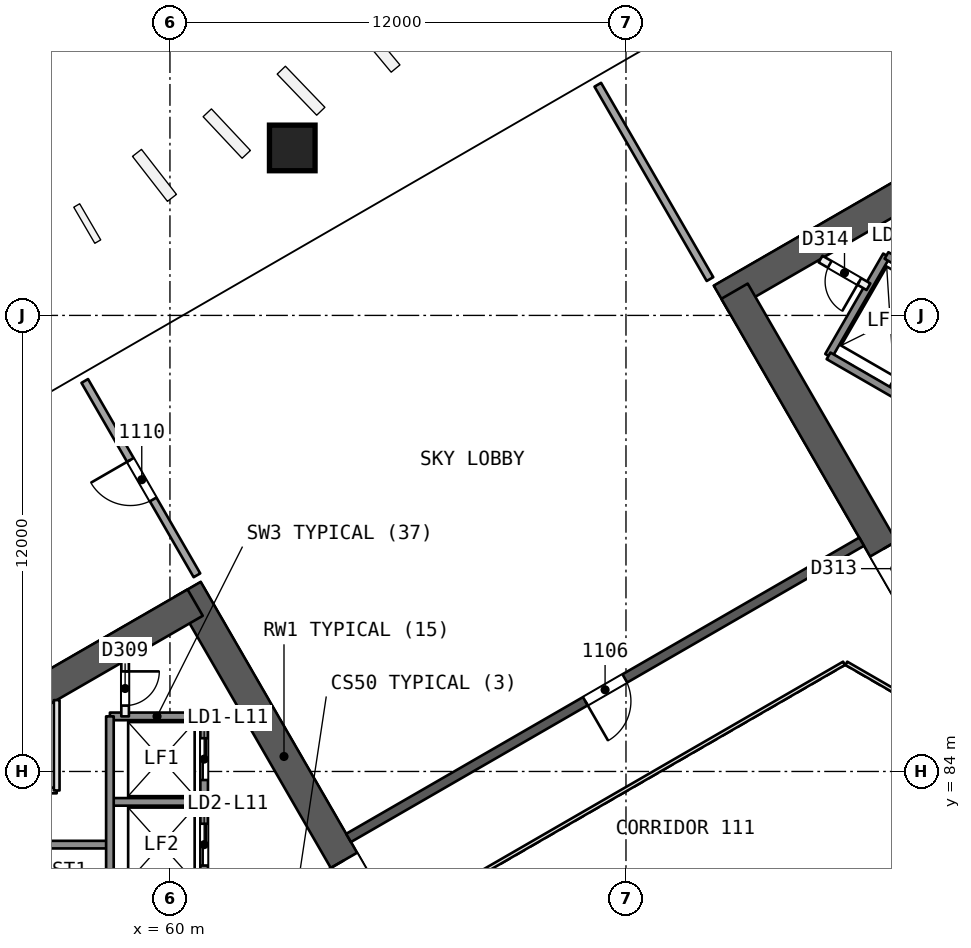
"""IFC4 building model, lengths in metres.
Left out: names, types, materials, properties, quantities, classifications, styles, units other than length and angle.
Written with IfcOpenShell. Run it as: python <this file> out.ifc"""

import sys

from ifc_helpers import new_model, si_unit, direction, frame, frame_2d, origin, origin_2d, place, context, subcontext, project, spatial, rectangle, extrude, element, fill, save


model = new_model("IFC4")
c1 = context("Model", 3, precision=1e-05, world=origin(), true_north=direction((0.0, 1.0)))
c2 = subcontext(c1, "Body", "Model", "MODEL_VIEW")
j1 = project(units=[si_unit("LENGTHUNIT", "METRE"), si_unit("PLANEANGLEUNIT", "RADIAN")], contexts=[c1])
p1 = place(None, origin())
s1 = spatial("IfcSite", under=j1, at=p1, CompositionType="ELEMENT")
p2 = place(p1, origin())
s2 = spatial("IfcBuilding", under=s1, at=p2, CompositionType="ELEMENT")
p3 = place(p2, frame((0.0, 0.0, 52.9)))
s3 = spatial("IfcBuildingStorey", under=s2, at=p3, CompositionType="ELEMENT", Elevation=52.9)
p4 = place(p3, frame((65.538, 80.0, 0.0), z_axis=(0.0, 0.0, 1.0), x_axis=(-0.49999662545, 0.866027352073, 0.0)))
e1 = element("IfcWall", 1, at=p4, inside=s3, PredefinedType="SHEAR", context=c2, shape_type="SweptSolid", body=[
    extrude(rectangle(XDim=10.149, YDim=0.8, at=frame_2d((5.074, 0.0))), origin(), (0.0, 0.0, 1.0), 4.4),
])
p5 = place(p4, frame((0.719, 0.0, 0.0)))
e2 = element("IfcOpeningElement", 2, at=p5, cuts=e1, PredefinedType="OPENING", context=c2, shape_type="SweptSolid", body=[
    extrude(rectangle(XDim=1.2, YDim=2.1, at=frame_2d((0.6, 1.05))), frame((0.0, 0.411, 0.0), z_axis=(0.0, -1.0, 0.0), x_axis=(1.0, 0.0, 0.0)), (0.0, 0.0, 1.0), 0.821),
])
p6 = place(p3, frame((60.664, 88.443, 0.0), z_axis=(0.0, 0.0, 1.0), x_axis=(-0.866029478545, -0.499992942241, 0.0)))
e3 = element("IfcWall", 3, at=p6, inside=s3, PredefinedType="SHEAR", context=c2, shape_type="SweptSolid", body=[
    extrude(rectangle(XDim=13.933, YDim=0.8, at=frame_2d((6.967, 0.0))), origin(), (0.0, 0.0, 1.0), 4.4),
])
p7 = place(p3, frame((86.723, 103.488, 0.0), z_axis=(0.0, 0.0, 1.0), x_axis=(-0.866032504327, -0.499987701298, 0.0)))
e4 = element("IfcWall", 4, at=p7, inside=s3, PredefinedType="SHEAR", context=c2, shape_type="SweptSolid", body=[
    extrude(rectangle(XDim=14.102, YDim=0.8, at=frame_2d((7.051, 0.0))), origin(), (0.0, 0.0, 1.0), 4.4),
])
p8 = place(p3, frame((74.856, 96.637, 0.0), z_axis=(0.0, 0.0, 1.0), x_axis=(0.499993500917, -0.866029155999, 0.0)))
e5 = element("IfcWall", 5, at=p8, inside=s3, PredefinedType="SHEAR", context=c2, shape_type="SweptSolid", body=[
    extrude(rectangle(XDim=9.98, YDim=0.8, at=frame_2d((4.99, 0.0))), origin(), (0.0, 0.0, 1.0), 4.4),
])
p9 = place(p8, frame((7.83, 0.0, 0.0)))
e6 = element("IfcOpeningElement", 6, at=p9, cuts=e5, PredefinedType="OPENING", context=c2, shape_type="SweptSolid", body=[
    extrude(rectangle(XDim=1.2, YDim=2.1, at=frame_2d((0.6, 1.05))), frame((0.0, 0.411, 0.0), z_axis=(0.0, -1.0, 0.0), x_axis=(1.0, 0.0, 0.0)), (0.0, 0.0, 1.0), 0.821),
])
p10 = place(p3, frame((78.2, 90.046, 0.0), z_axis=(0.0, 0.0, 1.0), x_axis=(-0.866026492143, -0.499998114903, 0.0)))
e7 = element("IfcWall", 7, at=p10, inside=s3, PredefinedType="SHEAR", context=c2, shape_type="SweptSolid", body=[
    extrude(rectangle(XDim=15.588, YDim=0.25, at=frame_2d((7.794, 0.0))), origin(), (0.0, 0.0, 1.0), 3.9),
])
p11 = place(p10, frame((7.194, 0.0, 0.0)))
e8 = element("IfcOpeningElement", 8, at=p11, cuts=e7, PredefinedType="OPENING", context=c2, shape_type="SweptSolid", body=[
    extrude(rectangle(XDim=1.2, YDim=2.4, at=frame_2d((0.6, 1.2))), frame((0.0, 0.135, 0.0), z_axis=(0.0, -1.0, 0.0), x_axis=(1.0, 0.0, 0.0)), (0.0, 0.0, 1.0), 0.271),
])
p12 = place(p3, frame((63.206, 100.427, 0.0), z_axis=(0.010096151254, -0.017474107939, 0.999796340902), x_axis=(-0.500171963961, 0.865690897347, 0.020181098047)))
e9 = element("IfcColumn", 9, at=p12, inside=s3, PredefinedType="COLUMN", context=c2, shape_type="SweptSolid", body=[
    extrude(rectangle(XDim=1.2, YDim=1.2, at=origin_2d()), origin(), (0.0, 0.0, 1.0), 4.401),
])
p13 = place(p3, frame((60.71, 89.162, 0.0), z_axis=(0.0, 0.0, 1.0), x_axis=(-0.49999445743, 0.866028603765, 0.0)))
e10 = element("IfcWall", 10, at=p13, inside=s3, PredefinedType="PARTITIONING", context=c2, shape_type="SweptSolid", body=[
    extrude(rectangle(XDim=5.905, YDim=0.2, at=frame_2d((2.952, 0.0))), origin(), (0.0, 0.0, 1.0), 3.9),
])
p14 = place(p13, frame((2.305, 0.0, 0.0)))
e11 = element("IfcOpeningElement", 11, at=p14, cuts=e10, PredefinedType="OPENING", context=c2, shape_type="SweptSolid", body=[
    extrude(rectangle(XDim=1.2, YDim=2.4, at=frame_2d((0.6, 1.2))), frame((0.0, 0.11, 0.0), z_axis=(0.0, -1.0, 0.0), x_axis=(1.0, 0.0, 0.0)), (0.0, 0.0, 1.0), 0.221),
])
p15 = place(p3, frame((71.258, 102.07, 0.0), z_axis=(0.0, 0.0, 1.0), x_axis=(0.49999445743, -0.866028603765, 0.0)))
e12 = element("IfcWall", 12, at=p15, inside=s3, PredefinedType="PARTITIONING", context=c2, shape_type="SweptSolid", body=[
    extrude(rectangle(XDim=5.905, YDim=0.2, at=frame_2d((2.952, 0.0))), origin(), (0.0, 0.0, 1.0), 3.9),
])
p16 = place(p3, frame((60.9, 85.45, 0.0), z_axis=(0.0, 0.0, 1.0), x_axis=(-1.0, 0.0, 0.0)))
e13 = element("IfcWall", 13, at=p16, inside=s3, PredefinedType="SOLIDWALL", context=c2, shape_type="SweptSolid", body=[
    extrude(rectangle(XDim=2.48, YDim=0.2, at=frame_2d((1.24, 0.0))), origin(), (0.0, 0.0, 1.0), 3.9),
])
p17 = place(p3, frame((57.02, 83.5, 0.0), z_axis=(0.0, 0.0, 1.0), x_axis=(-1.0, 0.0, 0.0)))
e14 = element("IfcWall", 14, at=p17, inside=s3, PredefinedType="PARTITIONING", context=c2, shape_type="SweptSolid", body=[
    extrude(rectangle(XDim=4.118, YDim=0.15, at=frame_2d((2.059, 0.0))), origin(), (0.0, 0.0, 1.0), 3.9),
])
p18 = place(p17, frame((1.582, 0.0, 0.0)))
e15 = element("IfcOpeningElement", 15, at=p18, cuts=e14, PredefinedType="OPENING", context=c2, shape_type="SweptSolid", body=[
    extrude(rectangle(XDim=0.9, YDim=2.1, at=frame_2d((0.45, 1.05))), frame((0.0, 0.085, 0.0), z_axis=(0.0, -1.0, 0.0), x_axis=(1.0, 0.0, 0.0)), (0.0, 0.0, 1.0), 0.171),
])
p19 = place(p3, frame((60.9, 83.2, 0.0), z_axis=(0.0, 0.0, 1.0), x_axis=(-1.0, 0.0, 0.0)))
e16 = element("IfcWall", 16, at=p19, inside=s3, PredefinedType="SOLIDWALL", context=c2, shape_type="SweptSolid", body=[
    extrude(rectangle(XDim=2.48, YDim=0.2, at=frame_2d((1.24, 0.0))), origin(), (0.0, 0.0, 1.0), 3.9),
])
p20 = place(p3, frame((58.42, 82.075, 0.0), z_axis=(0.0, 0.0, 1.0), x_axis=(-1.0, 0.0, 0.0)))
e17 = element("IfcWall", 17, at=p20, inside=s3, PredefinedType="SOLIDWALL", context=c2, shape_type="SweptSolid", body=[
    extrude(rectangle(XDim=7.7, YDim=0.2, at=frame_2d((3.85, 0.0))), origin(), (0.0, 0.0, 1.0), 3.9),
])
p21 = place(p3, frame((60.9, 85.45, 0.0), z_axis=(0.0, 0.0, 1.0), x_axis=(0.0, -1.0, 0.0)))
e18 = element("IfcWall", 18, at=p21, inside=s3, PredefinedType="SOLIDWALL", context=c2, shape_type="SweptSolid", body=[
    extrude(rectangle(XDim=10.9, YDim=0.2, at=frame_2d((5.45, 0.0))), origin(), (0.0, 0.0, 1.0), 3.9),
])
p22 = place(p21, frame((0.575, 0.0, 0.0)))
e19 = element("IfcOpeningElement", 19, at=p22, cuts=e18, PredefinedType="OPENING", context=c2, shape_type="SweptSolid", body=[
    extrude(rectangle(XDim=1.1, YDim=2.1, at=frame_2d((0.55, 1.05))), frame((0.0, 0.11, 0.0), z_axis=(0.0, -1.0, 0.0), x_axis=(1.0, 0.0, 0.0)), (0.0, 0.0, 1.0), 0.221),
])
p23 = place(p21, frame((2.825, 0.0, 0.0)))
e20 = element("IfcOpeningElement", 20, at=p23, cuts=e18, PredefinedType="OPENING", context=c2, shape_type="SweptSolid", body=[
    extrude(rectangle(XDim=1.1, YDim=2.1, at=frame_2d((0.55, 1.05))), frame((0.0, 0.11, 0.0), z_axis=(0.0, -1.0, 0.0), x_axis=(1.0, 0.0, 0.0)), (0.0, 0.0, 1.0), 0.221),
])
p24 = place(p21, frame((5.075, 0.0, 0.0)))
e21 = element("IfcOpeningElement", 21, at=p24, cuts=e18, PredefinedType="OPENING", context=c2, shape_type="SweptSolid", body=[
    extrude(rectangle(XDim=1.1, YDim=2.1, at=frame_2d((0.55, 1.05))), frame((0.0, 0.11, 0.0), z_axis=(0.0, -1.0, 0.0), x_axis=(1.0, 0.0, 0.0)), (0.0, 0.0, 1.0), 0.221),
])
p25 = place(p21, frame((7.325, 0.0, 0.0)))
e22 = element("IfcOpeningElement", 22, at=p25, cuts=e18, PredefinedType="OPENING", context=c2, shape_type="SweptSolid", body=[
    extrude(rectangle(XDim=1.1, YDim=2.1, at=frame_2d((0.55, 1.05))), frame((0.0, 0.11, 0.0), z_axis=(0.0, -1.0, 0.0), x_axis=(1.0, 0.0, 0.0)), (0.0, 0.0, 1.0), 0.221),
])
p26 = place(p3, frame((58.82, 86.917, 0.0), z_axis=(0.0, 0.0, 1.0), x_axis=(0.0, -1.0, 0.0)))
e23 = element("IfcWall", 23, at=p26, inside=s3, PredefinedType="PARTITIONING", context=c2, shape_type="SweptSolid", body=[
    extrude(rectangle(XDim=1.467, YDim=0.2, at=frame_2d((0.733, 0.0))), origin(), (0.0, 0.0, 1.0), 3.9),
])
p27 = place(p26, frame((0.283, 0.0, 0.0)))
e24 = element("IfcOpeningElement", 24, at=p27, cuts=e23, PredefinedType="OPENING", context=c2, shape_type="SweptSolid", body=[
    extrude(rectangle(XDim=0.9, YDim=2.1, at=frame_2d((0.45, 1.05))), frame((0.0, 0.11, 0.0), z_axis=(0.0, -1.0, 0.0), x_axis=(1.0, 0.0, 0.0)), (0.0, 0.0, 1.0), 0.221),
])
p28 = place(p3, frame((58.42, 85.45, 0.0), z_axis=(0.0, 0.0, 1.0), x_axis=(0.0, -1.0, 0.0)))
e25 = element("IfcWall", 25, at=p28, inside=s3, PredefinedType="SOLIDWALL", context=c2, shape_type="SweptSolid", body=[
    extrude(rectangle(XDim=9.0, YDim=0.2, at=frame_2d((4.5, 0.0))), origin(), (0.0, 0.0, 1.0), 3.9),
])
p29 = place(p3, frame((57.02, 85.877, 0.0), z_axis=(0.0, 0.0, 1.0), x_axis=(0.0, -1.0, 0.0)))
e26 = element("IfcWall", 26, at=p29, inside=s3, PredefinedType="PARTITIONING", context=c2, shape_type="SweptSolid", body=[
    extrude(rectangle(XDim=2.377, YDim=0.15, at=frame_2d((1.189, 0.0))), origin(), (0.0, 0.0, 1.0), 3.9),
])
for number, where, z_axis, x_axis in (
    (27, (78.976, 93.986, 0.0), (0.0, 0.0, 1.0), (0.5, 0.866, 0.0)),
    (28, (77.33, 94.936, 0.0), (0.0, 0.0, 1.0), (0.5, 0.866, 0.0)),
):
    element("IfcWall", number, at=place(p3, frame(where, z_axis=z_axis, x_axis=x_axis)), inside=s3, PredefinedType="SOLIDWALL", context=c2, shape_type="SweptSolid", body=[
        extrude(rectangle(XDim=3.05, YDim=0.2, at=frame_2d((1.525, 0.0))), origin(), (0.0, 0.0, 1.0), 3.9),
    ])
p30 = place(p3, frame((86.77, 89.486, 0.0), z_axis=(0.0, 0.0, 1.0), x_axis=(-0.86601811187, 0.500012629753, 0.0)))
e29 = element("IfcWall", 29, at=p30, inside=s3, PredefinedType="SOLIDWALL", context=c2, shape_type="SweptSolid", body=[
    extrude(rectangle(XDim=10.9, YDim=0.2, at=frame_2d((5.45, 0.0))), origin(), (0.0, 0.0, 1.0), 3.9),
])
p31 = place(p3, frame((78.38, 96.755, 0.0), z_axis=(0.0, 0.0, 1.0), x_axis=(-0.866003949776, 0.500037157592, 0.0)))
e30 = element("IfcWall", 30, at=p31, inside=s3, PredefinedType="PARTITIONING", context=c2, shape_type="SweptSolid", body=[
    extrude(rectangle(XDim=1.455, YDim=0.2, at=frame_2d((0.728, 0.0))), origin(), (0.0, 0.0, 1.0), 3.9),
])
p32 = place(p31, frame((0.278, 0.0, 0.0)))
e31 = element("IfcOpeningElement", 31, at=p32, cuts=e30, PredefinedType="OPENING", context=c2, shape_type="SweptSolid", body=[
    extrude(rectangle(XDim=0.9, YDim=2.1, at=frame_2d((0.45, 1.05))), frame((0.0, 0.11, 0.0), z_axis=(0.0, -1.0, 0.0), x_axis=(1.0, 0.0, 0.0)), (0.0, 0.0, 1.0), 0.221),
])
p33 = place(p3, frame((80.5, 96.627, 0.0), z_axis=(0.0, 0.0, 1.0), x_axis=(-0.86601224135, 0.500022797313, 0.0)))
e32 = element("IfcWall", 32, at=p33, inside=s3, PredefinedType="SOLIDWALL", context=c2, shape_type="SweptSolid", body=[
    extrude(rectangle(XDim=1.9, YDim=0.2, at=frame_2d((0.95, 0.0))), origin(), (0.0, 0.0, 1.0), 3.9),
])
p34 = place(p33, frame((0.4, 0.0, 0.0)))
e33 = element("IfcOpeningElement", 33, at=p34, cuts=e32, PredefinedType="OPENING", context=c2, shape_type="SweptSolid", body=[
    extrude(rectangle(XDim=1.1, YDim=2.1, at=frame_2d((0.55, 1.05))), frame((0.0, 0.11, 0.0), z_axis=(0.0, -1.0, 0.0), x_axis=(1.0, 0.0, 0.0)), (0.0, 0.0, 1.0), 0.221),
])
p35 = place(p3, frame((79.53, 85.846, 0.0), z_axis=(0.0, 0.0, 1.0), x_axis=(-0.866041268327, 0.499972520799, 0.0)))
e34 = element("IfcWall", 34, at=p35, inside=s3, PredefinedType="PARTITIONING", context=c2, shape_type="SweptSolid", body=[
    extrude(rectangle(XDim=2.0, YDim=0.1, at=frame_2d((1.0, 0.0))), origin(), (0.0, 0.0, 1.0), 3.9),
])
p36 = place(p3, frame((77.738, 86.846, 0.0), z_axis=(0.0, 0.0, 1.0), x_axis=(-0.866026658274, -0.499997827154, 0.0)))
e35 = element("IfcWall", 35, at=p36, inside=s3, PredefinedType="PARTITIONING", context=c2, shape_type="SweptSolid", body=[
    extrude(rectangle(XDim=11.588, YDim=0.1, at=frame_2d((5.794, 0.0))), origin(), (0.0, 0.0, 1.0), 3.9),
])
p37 = place(p11, origin())
e36 = element("IfcDoor", 36, at=p37, inside=s3, OperationType="SINGLE_SWING_RIGHT", PredefinedType="NOTDEFINED", context=c2, shape_type="SweptSolid", body=[
    extrude(rectangle(XDim=1.2, YDim=2.4, at=frame_2d((0.6, 1.2))), frame((0.0, 0.025, 0.0), z_axis=(0.0, -1.0, 0.0), x_axis=(1.0, 0.0, 0.0)), (0.0, 0.0, 1.0), 0.05),
])
fill(e8, e36)
p38 = place(p14, origin())
e37 = element("IfcDoor", 37, at=p38, inside=s3, OperationType="SINGLE_SWING_RIGHT", PredefinedType="NOTDEFINED", context=c2, shape_type="SweptSolid", body=[
    extrude(rectangle(XDim=1.2, YDim=2.4, at=frame_2d((0.6, 1.2))), frame((0.0, 0.025, 0.0), z_axis=(0.0, -1.0, 0.0), x_axis=(1.0, 0.0, 0.0)), (0.0, 0.0, 1.0), 0.05),
])
fill(e11, e37)
p39 = place(p5, origin())
e38 = element("IfcDoor", 38, at=p39, inside=s3, OperationType="SINGLE_SWING_RIGHT", PredefinedType="NOTDEFINED", context=c2, shape_type="SweptSolid", body=[
    extrude(rectangle(XDim=1.2, YDim=2.1, at=frame_2d((0.6, 1.05))), frame((0.0, 0.025, 0.0), z_axis=(0.0, -1.0, 0.0), x_axis=(1.0, 0.0, 0.0)), (0.0, 0.0, 1.0), 0.05),
])
fill(e2, e38)
p40 = place(p22, origin())
e39 = element("IfcDoor", 39, at=p40, inside=s3, OperationType="SLIDING_TO_RIGHT", PredefinedType="NOTDEFINED", context=c2, shape_type="SweptSolid", body=[
    extrude(rectangle(XDim=1.1, YDim=2.1, at=frame_2d((0.55, 1.05))), frame((0.0, 0.025, 0.0), z_axis=(0.0, -1.0, 0.0), x_axis=(1.0, 0.0, 0.0)), (0.0, 0.0, 1.0), 0.05),
])
fill(e19, e39)
p41 = place(p23, origin())
e40 = element("IfcDoor", 40, at=p41, inside=s3, OperationType="SLIDING_TO_LEFT", PredefinedType="NOTDEFINED", context=c2, shape_type="SweptSolid", body=[
    extrude(rectangle(XDim=1.1, YDim=2.1, at=frame_2d((0.55, 1.05))), frame((0.0, 0.025, 0.0), z_axis=(0.0, -1.0, 0.0), x_axis=(1.0, 0.0, 0.0)), (0.0, 0.0, 1.0), 0.05),
])
fill(e20, e40)
p42 = place(p27, origin())
e41 = element("IfcDoor", 41, at=p42, inside=s3, OperationType="SINGLE_SWING_LEFT", PredefinedType="NOTDEFINED", context=c2, shape_type="SweptSolid", body=[
    extrude(rectangle(XDim=0.9, YDim=2.1, at=frame_2d((0.45, 1.05))), frame((0.0, 0.025, 0.0), z_axis=(0.0, -1.0, 0.0), x_axis=(1.0, 0.0, 0.0)), (0.0, 0.0, 1.0), 0.05),
])
fill(e24, e41)
p43 = place(p9, origin())
e42 = element("IfcDoor", 42, at=p43, inside=s3, OperationType="SINGLE_SWING_LEFT", PredefinedType="NOTDEFINED", context=c2, shape_type="SweptSolid", body=[
    extrude(rectangle(XDim=1.2, YDim=2.1, at=frame_2d((0.6, 1.05))), frame((0.0, 0.025, 0.0), z_axis=(0.0, -1.0, 0.0), x_axis=(1.0, 0.0, 0.0)), (0.0, 0.0, 1.0), 0.05),
])
fill(e6, e42)
p44 = place(p32, origin())
e43 = element("IfcDoor", 43, at=p44, inside=s3, OperationType="SINGLE_SWING_LEFT", PredefinedType="NOTDEFINED", context=c2, shape_type="SweptSolid", body=[
    extrude(rectangle(XDim=0.9, YDim=2.1, at=frame_2d((0.45, 1.05))), frame((0.0, 0.025, 0.0), z_axis=(0.0, -1.0, 0.0), x_axis=(1.0, 0.0, 0.0)), (0.0, 0.0, 1.0), 0.05),
])
fill(e31, e43)
save(model, sys.argv[1])
